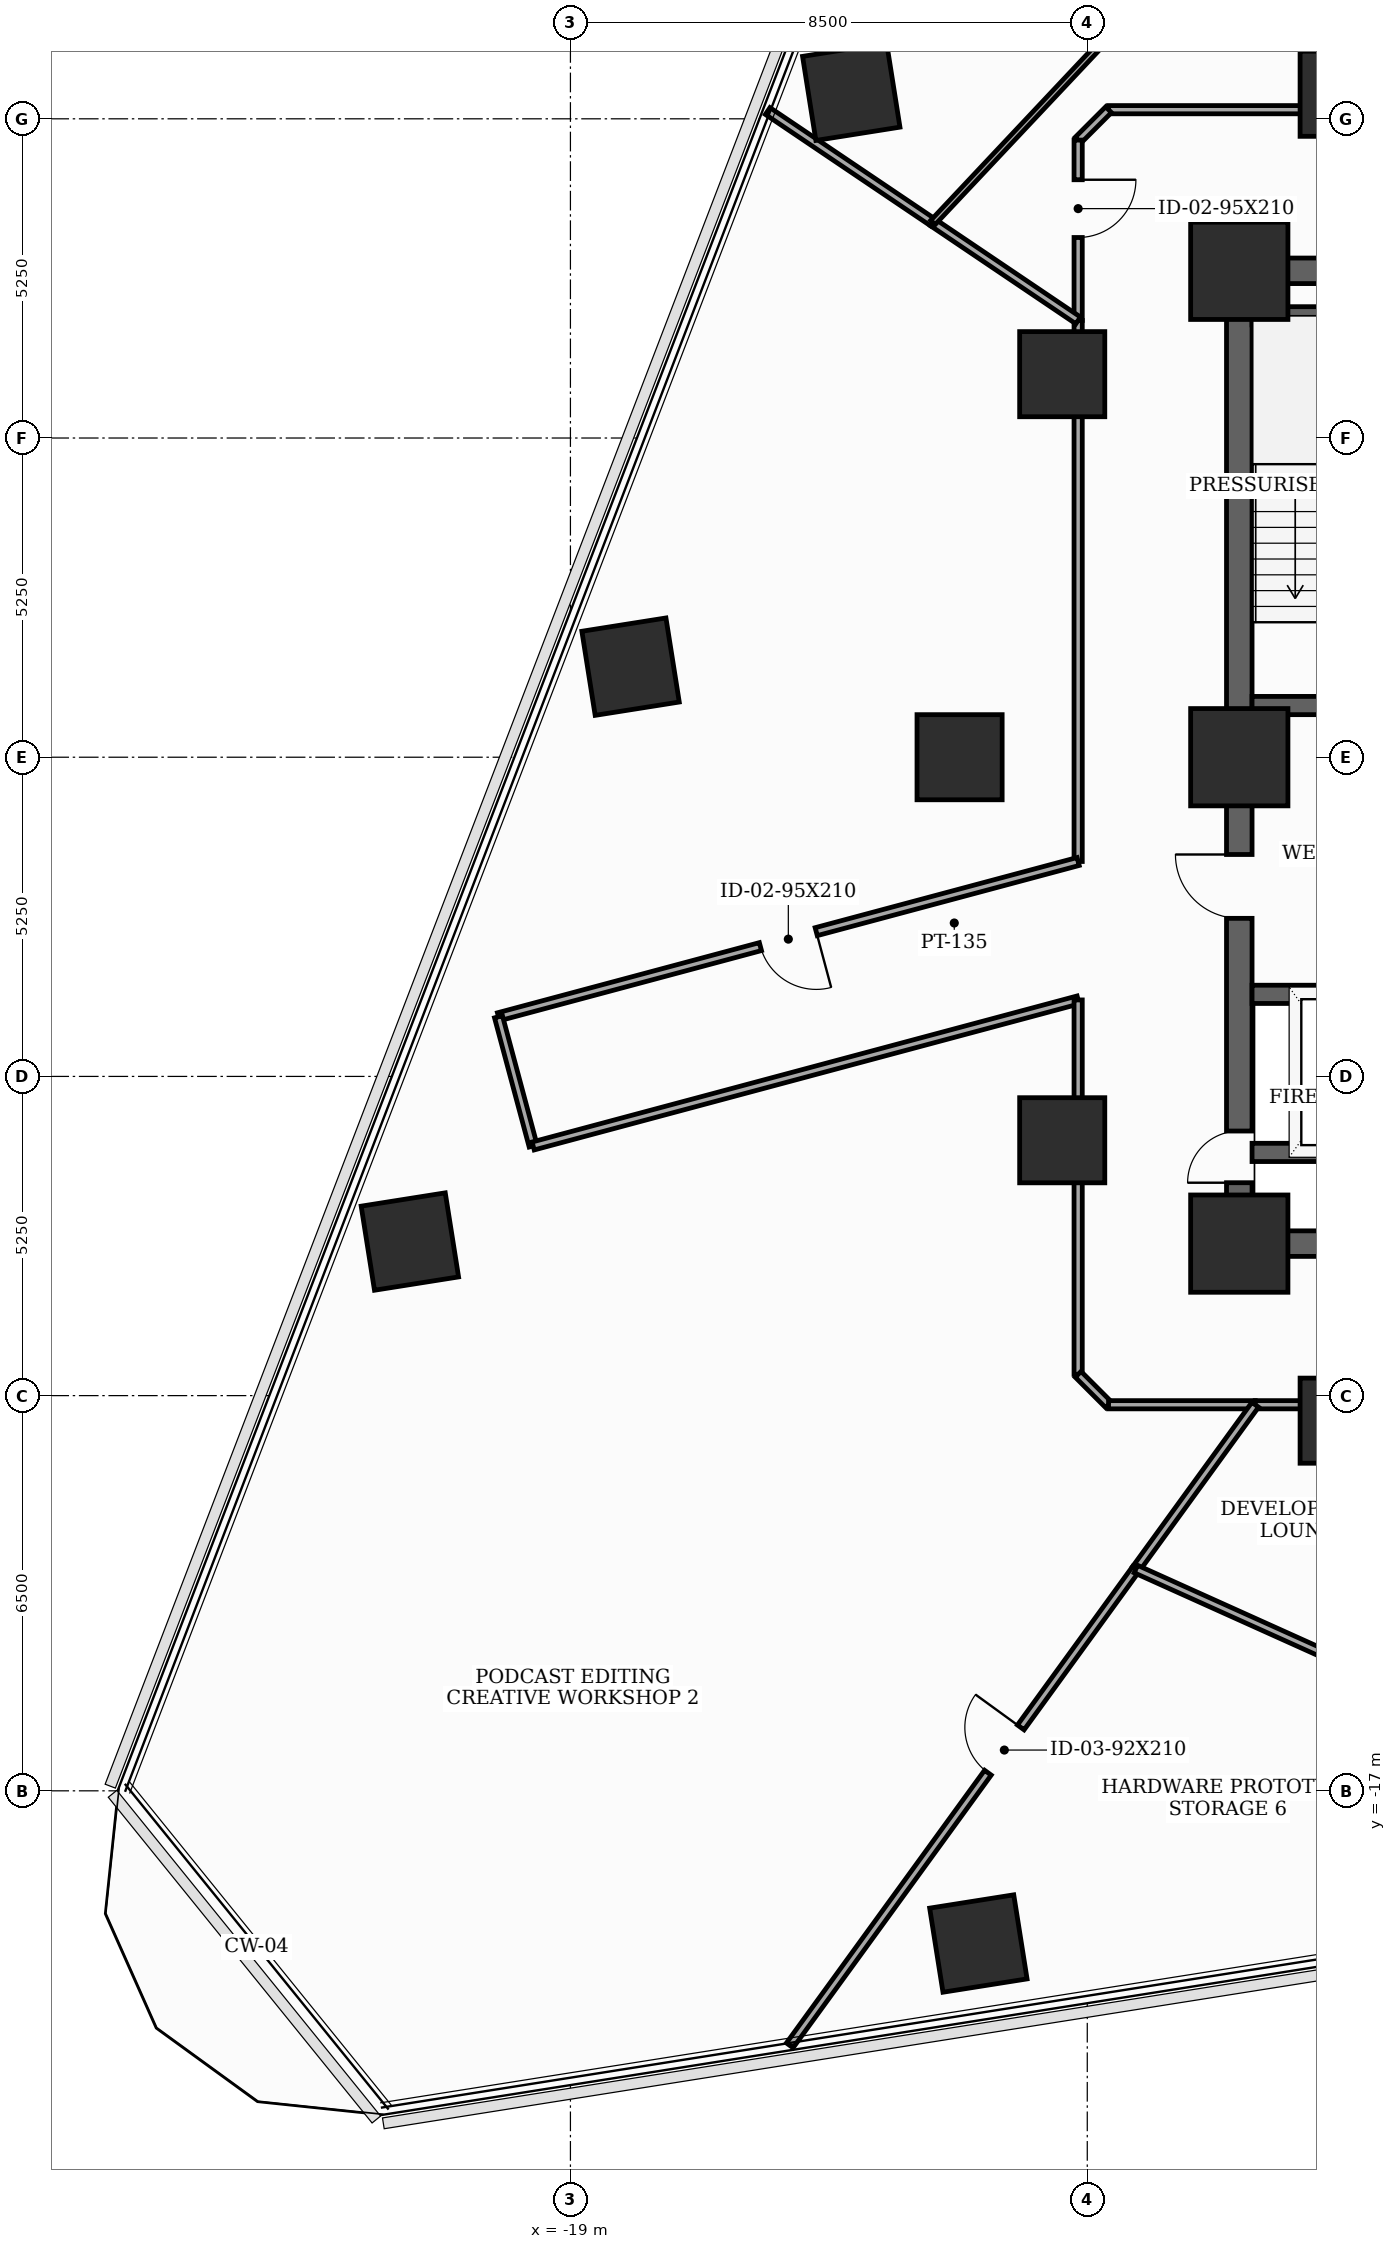
"""IFC4 building model, lengths in metres.
Left out: names, types, materials, properties, quantities, classifications, styles, units other than length and angle.
Written with IfcOpenShell. Run it as: python <this file> out.ifc"""

import sys

from ifc_helpers import new_model, si_unit, direction, frame, frame_2d, origin, origin_2d, place, context, subcontext, project, spatial, rectangle, extrude, element, fill, save


model = new_model("IFC4")
c1 = context("Model", 3, precision=1e-05, world=origin(), true_north=direction((0.0, 1.0)))
c2 = subcontext(c1, "Body", "Model", "MODEL_VIEW")
j1 = project(units=[si_unit("LENGTHUNIT", "METRE"), si_unit("PLANEANGLEUNIT", "RADIAN")], contexts=[c1])
p1 = place(None, origin())
s1 = spatial("IfcSite", under=j1, at=p1, CompositionType="ELEMENT")
p2 = place(p1, origin())
s2 = spatial("IfcBuilding", under=s1, at=p2, CompositionType="ELEMENT")
p3 = place(p2, frame((0.0, 0.0, 63.0)))
s3 = spatial("IfcBuildingStorey", under=s2, at=p3, CompositionType="ELEMENT", Elevation=63.0)
for number, where, z_axis, x_axis in (
    (1, (-8.0, -8.0, 0.0), (0.0, 0.0, 1.0), (1.0, 0.0, 0.0)),
    (2, (-8.0, 8.0, 0.0), (0.0, 0.0, 1.0), (1.0, 0.0, 0.0)),
    (3, (-8.0, 0.0, 0.0), (0.0, 0.0, 1.0), (1.0, 0.0, 0.0)),
):
    element("IfcColumn", number, at=place(p3, frame(where, z_axis=z_axis, x_axis=x_axis)), inside=s3, PredefinedType="COLUMN", context=c2, shape_type="SweptSolid", body=[
        extrude(rectangle(XDim=1.6, YDim=1.6, at=origin_2d()), origin(), (0.0, 0.0, 1.0), 3.7),
    ])
for number, where, z_axis, x_axis in (
    (4, (-6.3, 10.912, 0.0), (0.0, 0.0, 1.0), (1.0, 0.0, 0.0)),
    (5, (-10.912, 6.3, 0.0), (0.0, 0.0, 1.0), (1.0, 0.0, 0.0)),
    (6, (-12.6, 0.0, 0.0), (0.0, 0.0, 1.0), (1.0, 0.0, 0.0)),
    (7, (-10.912, -6.3, 0.0), (0.0, 0.0, 1.0), (1.0, 0.0, 0.0)),
    (8, (-6.3, -10.912, 0.0), (0.0, 0.0, 1.0), (1.0, 0.0, 0.0)),
    (9, (-12.291, -19.511, 0.0), (0.0, 0.0, 1.0), (0.988, 0.156, 0.0)),
    (10, (-14.381, 10.945, 0.0), (0.0, 0.0, 1.0), (0.988, 0.156, 0.0)),
    (11, (-18.011, 1.49, 0.0), (0.0, 0.0, 1.0), (0.988, 0.156, 0.0)),
    (12, (-21.641, -7.966, 0.0), (0.0, 0.0, 1.0), (0.988, 0.156, 0.0)),
):
    element("IfcColumn", number, at=place(p3, frame(where, z_axis=z_axis, x_axis=x_axis)), inside=s3, PredefinedType="COLUMN", context=c2, shape_type="SweptSolid", body=[
        extrude(rectangle(XDim=1.4, YDim=1.4, at=origin_2d()), origin(), (0.0, 0.0, 1.0), 3.7),
    ])
p4 = place(p3, frame((-8.0, -8.0, 0.0), z_axis=(0.0, 0.0, 1.0), x_axis=(0.0, 1.0, 0.0)))
e13 = element("IfcWall", 13, at=p4, inside=s3, PredefinedType="SHEAR", context=c2, shape_type="SweptSolid", body=[
    extrude(rectangle(XDim=16.0, YDim=0.42, at=frame_2d((8.0, 0.0))), origin(), (0.0, 0.0, 1.0), 3.5),
])
p5 = place(p4, frame((1.002, 0.0, 0.0)))
e14 = element("IfcOpeningElement", 14, at=p5, cuts=e13, PredefinedType="OPENING", context=c2, shape_type="SweptSolid", body=[
    extrude(rectangle(XDim=0.85, YDim=2.02, at=frame_2d((0.425, 1.01))), frame((0.0, 0.22, 0.0), z_axis=(0.0, -1.0, 0.0), x_axis=(1.0, 0.0, 0.0)), (0.0, 0.0, 1.0), 0.44),
])
p6 = place(p4, frame((5.35, 0.0, 0.0)))
e15 = element("IfcOpeningElement", 15, at=p6, cuts=e13, PredefinedType="OPENING", context=c2, shape_type="SweptSolid", body=[
    extrude(rectangle(XDim=1.05, YDim=2.15, at=frame_2d((0.525, 1.075))), frame((0.0, 0.22, 0.0), z_axis=(0.0, -1.0, 0.0), x_axis=(1.0, 0.0, 0.0)), (0.0, 0.0, 1.0), 0.44),
])
p7 = place(p3, frame((-8.0, -8.0, 0.0), z_axis=(0.0, 0.0, 1.0), x_axis=(1.0, 0.0, 0.0)))
e16 = element("IfcWall", 16, at=p7, inside=s3, PredefinedType="SHEAR", context=c2, shape_type="SweptSolid", body=[
    extrude(rectangle(XDim=16.0, YDim=0.42, at=frame_2d((8.0, 0.0))), origin(), (0.0, 0.0, 1.0), 3.5),
])
p8 = place(p7, frame((5.2, 0.0, 0.0)))
e17 = element("IfcOpeningElement", 17, at=p8, cuts=e16, PredefinedType="OPENING", context=c2, shape_type="SweptSolid", body=[
    extrude(rectangle(XDim=0.95, YDim=2.1, at=frame_2d((0.475, 1.05))), frame((0.0, 0.22, 0.0), z_axis=(0.0, -1.0, 0.0), x_axis=(1.0, 0.0, 0.0)), (0.0, 0.0, 1.0), 0.44),
])
p9 = place(p7, frame((9.8, 0.0, 0.0)))
e18 = element("IfcOpeningElement", 18, at=p9, cuts=e16, PredefinedType="OPENING", context=c2, shape_type="SweptSolid", body=[
    extrude(rectangle(XDim=0.95, YDim=2.1, at=frame_2d((0.475, 1.05))), frame((0.0, 0.22, 0.0), z_axis=(0.0, -1.0, 0.0), x_axis=(1.0, 0.0, 0.0)), (0.0, 0.0, 1.0), 0.44),
])
p10 = place(p3, frame((-8.0, 8.0, 0.0), z_axis=(0.0, 0.0, 1.0), x_axis=(1.0, 0.0, 0.0)))
e19 = element("IfcWall", 19, at=p10, inside=s3, PredefinedType="SHEAR", context=c2, shape_type="SweptSolid", body=[
    extrude(rectangle(XDim=16.0, YDim=0.42, at=frame_2d((8.0, 0.0))), origin(), (0.0, 0.0, 1.0), 3.5),
])
p11 = place(p10, frame((7.1, 0.0, 0.0)))
e20 = element("IfcOpeningElement", 20, at=p11, cuts=e19, PredefinedType="OPENING", context=c2, shape_type="SweptSolid", body=[
    extrude(rectangle(XDim=1.8, YDim=2.15, at=frame_2d((0.9, 1.075))), frame((0.0, 0.22, 0.0), z_axis=(0.0, -1.0, 0.0), x_axis=(1.0, 0.0, 0.0)), (0.0, 0.0, 1.0), 0.44),
])
p12 = place(p3, frame((-7.79, 0.85, 0.0), z_axis=(0.0, 0.0, 1.0), x_axis=(1.0, 0.0, 0.0)))
e21 = element("IfcWall", 21, at=p12, inside=s3, PredefinedType="SHEAR", context=c2, shape_type="SweptSolid", body=[
    extrude(rectangle(XDim=3.34, YDim=0.3, at=frame_2d((1.67, 0.0))), origin(), (0.0, 0.0, 1.0), 3.5),
])
p13 = place(p12, frame((1.85, 0.0, 0.0)))
e22 = element("IfcOpeningElement", 22, at=p13, cuts=e21, PredefinedType="OPENING", context=c2, shape_type="SweptSolid", body=[
    extrude(rectangle(XDim=1.05, YDim=2.15, at=frame_2d((0.525, 1.075))), frame((0.0, 0.16, 0.0), z_axis=(0.0, -1.0, 0.0), x_axis=(1.0, 0.0, 0.0)), (0.0, 0.0, 1.0), 0.32),
])
p14 = place(p3, frame((-7.79, 7.26, 0.0), z_axis=(0.0, 0.0, 1.0), x_axis=(1.0, 0.0, 0.0)))
e23 = element("IfcWall", 23, at=p14, inside=s3, PredefinedType="SHEAR", context=c2, shape_type="SweptSolid", body=[
    extrude(rectangle(XDim=3.34, YDim=0.3, at=frame_2d((1.67, 0.0))), origin(), (0.0, 0.0, 1.0), 3.5),
])
p15 = place(p3, frame((-7.79, -3.9, 0.0), z_axis=(0.0, 0.0, 1.0), x_axis=(1.0, 0.0, 0.0)))
e24 = element("IfcWall", 24, at=p15, inside=s3, PredefinedType="SHEAR", context=c2, shape_type="SweptSolid", body=[
    extrude(rectangle(XDim=3.34, YDim=0.3, at=frame_2d((1.67, 0.0))), origin(), (0.0, 0.0, 1.0), 3.5),
])
p16 = place(p15, frame((1.27, 0.0, 0.0)))
e25 = element("IfcOpeningElement", 25, at=p16, cuts=e24, PredefinedType="OPENING", context=c2, shape_type="SweptSolid", body=[
    extrude(rectangle(XDim=1.1, YDim=2.1, at=frame_2d((0.55, 1.05))), frame((0.0, 0.16, 0.0), z_axis=(0.0, -1.0, 0.0), x_axis=(1.0, 0.0, 0.0)), (0.0, 0.0, 1.0), 0.32),
])
p17 = place(p3, frame((-7.79, -6.5, 0.0), z_axis=(0.0, 0.0, 1.0), x_axis=(1.0, 0.0, 0.0)))
e26 = element("IfcWall", 26, at=p17, inside=s3, PredefinedType="SHEAR", context=c2, shape_type="SweptSolid", body=[
    extrude(rectangle(XDim=3.34, YDim=0.3, at=frame_2d((1.67, 0.0))), origin(), (0.0, 0.0, 1.0), 3.5),
])
p18 = place(p3, frame((-10.65, 7.184, 0.0), z_axis=(0.0, 0.0, 1.0), x_axis=(0.0, -1.0, 0.0)))
e27 = element("IfcWall", 27, at=p18, inside=s3, PredefinedType="PARTITIONING", context=c2, shape_type="SweptSolid", body=[
    extrude(rectangle(XDim=8.899, YDim=0.135, at=frame_2d((4.45, 0.0))), origin(), (0.0, 0.0, 1.0), 2.785),
])
p19 = place(p3, frame((-10.65, -1.715, 0.0), z_axis=(0.0, 0.0, 1.0), x_axis=(-0.965937452198, -0.258775652721, 0.0)))
e28 = element("IfcWall", 28, at=p19, inside=s3, PredefinedType="PARTITIONING", context=c2, shape_type="SweptSolid", body=[
    extrude(rectangle(XDim=9.869, YDim=0.135, at=frame_2d((4.935, 0.0))), origin(), (0.0, 0.0, 1.0), 2.785),
])
p20 = place(p19, frame((4.46, 0.0, 0.0)))
e29 = element("IfcOpeningElement", 29, at=p20, cuts=e28, PredefinedType="OPENING", context=c2, shape_type="SweptSolid", body=[
    extrude(rectangle(XDim=0.95, YDim=2.1, at=frame_2d((0.475, 1.05))), frame((0.0, 0.077, 0.0), z_axis=(0.0, -1.0, 0.0), x_axis=(1.0, 0.0, 0.0)), (0.0, 0.0, 1.0), 0.155),
])
p21 = place(p3, frame((-20.183, -4.269, 0.0), z_axis=(0.0, 0.0, 1.0), x_axis=(0.259105843213, -0.965848933329, 0.0)))
e30 = element("IfcWall", 30, at=p21, inside=s3, PredefinedType="PARTITIONING", context=c2, shape_type="SweptSolid", body=[
    extrude(rectangle(XDim=2.2, YDim=0.135, at=frame_2d((1.1, 0.0))), origin(), (0.0, 0.0, 1.0), 2.935),
])
p22 = place(p3, frame((-19.613, -6.394, 0.0), z_axis=(0.0, 0.0, 1.0), x_axis=(0.96591410887, 0.258862771148, 0.0)))
e31 = element("IfcWall", 31, at=p22, inside=s3, PredefinedType="PARTITIONING", context=c2, shape_type="SweptSolid", body=[
    extrude(rectangle(XDim=9.28, YDim=0.135, at=frame_2d((4.64, 0.0))), origin(), (0.0, 0.0, 1.0), 2.785),
])
p23 = place(p3, frame((-10.65, -3.992, 0.0), z_axis=(0.0, 0.0, 1.0), x_axis=(0.0, -1.0, 0.0)))
e32 = element("IfcWall", 32, at=p23, inside=s3, PredefinedType="PARTITIONING", context=c2, shape_type="SweptSolid", body=[
    extrude(rectangle(XDim=6.158, YDim=0.135, at=frame_2d((3.079, 0.0))), origin(), (0.0, 0.0, 1.0), 2.785),
])
p24 = place(p3, frame((-10.65, -10.15, 0.0), z_axis=(0.0, 0.0, 1.0), x_axis=(0.707106781187, -0.707106781187, 0.0)))
e33 = element("IfcWall", 33, at=p24, inside=s3, PredefinedType="PARTITIONING", context=c2, shape_type="SweptSolid", body=[
    extrude(rectangle(XDim=0.707, YDim=0.135, at=frame_2d((0.354, 0.0))), origin(), (0.0, 0.0, 1.0), 3.5),
])
p25 = place(p3, frame((-10.15, -10.65, 0.0), z_axis=(0.0, 0.0, 1.0), x_axis=(1.0, 0.0, 0.0)))
e34 = element("IfcWall", 34, at=p25, inside=s3, PredefinedType="PARTITIONING", context=c2, shape_type="SweptSolid", body=[
    extrude(rectangle(XDim=2.412, YDim=0.135, at=frame_2d((1.206, 0.0))), origin(), (0.0, 0.0, 1.0), 3.5),
])
p26 = place(p3, frame((-7.738, -10.65, 0.0), z_axis=(0.0, 0.0, 1.0), x_axis=(1.0, 0.0, 0.0)))
e35 = element("IfcWall", 35, at=p26, inside=s3, PredefinedType="PARTITIONING", context=c2, shape_type="SweptSolid", body=[
    extrude(rectangle(XDim=2.888, YDim=0.135, at=frame_2d((1.444, 0.0))), origin(), (0.0, 0.0, 1.0), 2.785),
])
p27 = place(p3, frame((-3.054, 10.65, 0.0), z_axis=(0.0, 0.0, 1.0), x_axis=(-1.0, 0.0, 0.0)))
e36 = element("IfcWall", 36, at=p27, inside=s3, PredefinedType="PARTITIONING", context=c2, shape_type="SweptSolid", body=[
    extrude(rectangle(XDim=7.096, YDim=0.135, at=frame_2d((3.548, 0.0))), origin(), (0.0, 0.0, 1.0), 2.785),
])
p28 = place(p3, frame((-10.15, 10.65, 0.0), z_axis=(0.0, 0.0, 1.0), x_axis=(-0.707106781187, -0.707106781187, 0.0)))
e37 = element("IfcWall", 37, at=p28, inside=s3, PredefinedType="PARTITIONING", context=c2, shape_type="SweptSolid", body=[
    extrude(rectangle(XDim=0.707, YDim=0.135, at=frame_2d((0.354, 0.0))), origin(), (0.0, 0.0, 1.0), 3.5),
])
p29 = place(p3, frame((-10.65, 10.15, 0.0), z_axis=(0.0, 0.0, 1.0), x_axis=(0.0, -1.0, 0.0)))
e38 = element("IfcWall", 38, at=p29, inside=s3, PredefinedType="PARTITIONING", context=c2, shape_type="SweptSolid", body=[
    extrude(rectangle(XDim=2.966, YDim=0.135, at=frame_2d((1.483, 0.0))), origin(), (0.0, 0.0, 1.0), 3.5),
])
p30 = place(p29, frame((0.652, 0.0, 0.0)))
e39 = element("IfcOpeningElement", 39, at=p30, cuts=e38, PredefinedType="OPENING", context=c2, shape_type="SweptSolid", body=[
    extrude(rectangle(XDim=0.95, YDim=2.1, at=frame_2d((0.475, 1.05))), frame((0.0, 0.077, 0.0), z_axis=(0.0, -1.0, 0.0), x_axis=(1.0, 0.0, 0.0)), (0.0, 0.0, 1.0), 0.155),
])
p31 = place(p3, frame((-15.393, -21.187, 0.0), z_axis=(0.0, 0.0, 1.0), x_axis=(0.587736917223, 0.809052109653, 0.0)))
e40 = element("IfcWall", 40, at=p31, inside=s3, PredefinedType="PARTITIONING", context=c2, shape_type="SweptSolid", body=[
    extrude(rectangle(XDim=9.684, YDim=0.135, at=frame_2d((4.842, 0.0))), origin(), (0.0, 0.0, 1.0), 2.935),
])
p32 = place(p31, frame((5.544, 0.0, 0.0)))
e41 = element("IfcOpeningElement", 41, at=p32, cuts=e40, PredefinedType="OPENING", context=c2, shape_type="SweptSolid", body=[
    extrude(rectangle(XDim=0.92, YDim=2.1, at=frame_2d((0.46, 1.05))), frame((0.0, 0.077, 0.0), z_axis=(0.0, -1.0, 0.0), x_axis=(1.0, 0.0, 0.0)), (0.0, 0.0, 1.0), 0.155),
])
p33 = place(p3, frame((-9.701, -13.352, 0.0), z_axis=(0.0, 0.0, 1.0), x_axis=(0.587719574609, 0.809064707932, 0.0)))
e42 = element("IfcWall", 42, at=p33, inside=s3, PredefinedType="PARTITIONING", context=c2, shape_type="SweptSolid", body=[
    extrude(rectangle(XDim=3.34, YDim=0.135, at=frame_2d((1.67, 0.0))), origin(), (0.0, 0.0, 1.0), 3.5),
])
p34 = place(p3, frame((-13.038, 8.795, 0.0), z_axis=(0.0, 0.0, 1.0), x_axis=(-0.829071326064, 0.559142858578, 0.0)))
e43 = element("IfcWall", 43, at=p34, inside=s3, PredefinedType="PARTITIONING", context=c2, shape_type="SweptSolid", body=[
    extrude(rectangle(XDim=3.279, YDim=0.135, at=frame_2d((1.639, 0.0))), origin(), (0.0, 0.0, 1.0), 2.785),
])
p35 = place(p3, frame((-10.65, 7.184, 0.0), z_axis=(0.0, 0.0, 1.0), x_axis=(-0.829039234985, 0.559190438809, 0.0)))
e44 = element("IfcWall", 44, at=p35, inside=s3, PredefinedType="PARTITIONING", context=c2, shape_type="SweptSolid", body=[
    extrude(rectangle(XDim=2.881, YDim=0.135, at=frame_2d((1.44, 0.0))), origin(), (0.0, 0.0, 1.0), 2.785),
])
p36 = place(p3, frame((-3.167, -16.295, 0.0), z_axis=(0.0, 0.0, 1.0), x_axis=(-0.911785675506, 0.410666387645, 0.0)))
e45 = element("IfcWall", 45, at=p36, inside=s3, PredefinedType="PARTITIONING", context=c2, shape_type="SweptSolid", body=[
    extrude(rectangle(XDim=7.166, YDim=0.135, at=frame_2d((3.583, 0.0))), origin(), (0.0, 0.0, 1.0), 2.785),
])
p37 = place(p3, frame((-13.038, 8.795, 0.0), z_axis=(0.0, 0.0, 1.0), x_axis=(0.685214439986, 0.728341383716, 0.0)))
e46 = element("IfcWall", 46, at=p37, inside=s3, PredefinedType="MOVABLE", context=c2, shape_type="SweptSolid", body=[
    extrude(rectangle(XDim=5.474, YDim=0.1, at=frame_2d((2.737, 0.0))), origin(), (0.0, 0.0, 1.0), 2.785),
])
p38 = place(p5, origin())
e47 = element("IfcDoor", 47, at=p38, inside=s3, OperationType="SINGLE_SWING_LEFT", PredefinedType="TRAPDOOR", context=c2, shape_type="SweptSolid", body=[
    extrude(rectangle(XDim=0.85, YDim=2.02, at=frame_2d((0.425, 1.01))), frame((0.0, 0.025, 0.0), z_axis=(0.0, -1.0, 0.0), x_axis=(1.0, 0.0, 0.0)), (0.0, 0.0, 1.0), 0.05),
])
fill(e14, e47)
p39 = place(p6, origin())
e48 = element("IfcDoor", 48, at=p39, inside=s3, OperationType="SINGLE_SWING_RIGHT", PredefinedType="DOOR", context=c2, shape_type="SweptSolid", body=[
    extrude(rectangle(XDim=1.05, YDim=2.15, at=frame_2d((0.525, 1.075))), frame((0.0, 0.025, 0.0), z_axis=(0.0, -1.0, 0.0), x_axis=(1.0, 0.0, 0.0)), (0.0, 0.0, 1.0), 0.05),
])
fill(e15, e48)
p40 = place(p20, origin())
e49 = element("IfcDoor", 49, at=p40, inside=s3, OperationType="SINGLE_SWING_LEFT", PredefinedType="DOOR", context=c2, shape_type="SweptSolid", body=[
    extrude(rectangle(XDim=0.95, YDim=2.1, at=frame_2d((0.475, 1.05))), frame((0.0, 0.025, 0.0), z_axis=(0.0, -1.0, 0.0), x_axis=(1.0, 0.0, 0.0)), (0.0, 0.0, 1.0), 0.05),
])
fill(e29, e49)
p41 = place(p30, origin())
e50 = element("IfcDoor", 50, at=p41, inside=s3, OperationType="SINGLE_SWING_LEFT", PredefinedType="DOOR", context=c2, shape_type="SweptSolid", body=[
    extrude(rectangle(XDim=0.95, YDim=2.1, at=frame_2d((0.475, 1.05))), frame((0.0, 0.025, 0.0), z_axis=(0.0, -1.0, 0.0), x_axis=(1.0, 0.0, 0.0)), (0.0, 0.0, 1.0), 0.05),
])
fill(e39, e50)
p42 = place(p32, origin())
e51 = element("IfcDoor", 51, at=p42, inside=s3, OperationType="SINGLE_SWING_RIGHT", PredefinedType="DOOR", context=c2, shape_type="SweptSolid", body=[
    extrude(rectangle(XDim=0.92, YDim=2.1, at=frame_2d((0.46, 1.05))), frame((0.0, 0.025, 0.0), z_axis=(0.0, -1.0, 0.0), x_axis=(1.0, 0.0, 0.0)), (0.0, 0.0, 1.0), 0.05),
])
fill(e41, e51)
save(model, sys.argv[1])
